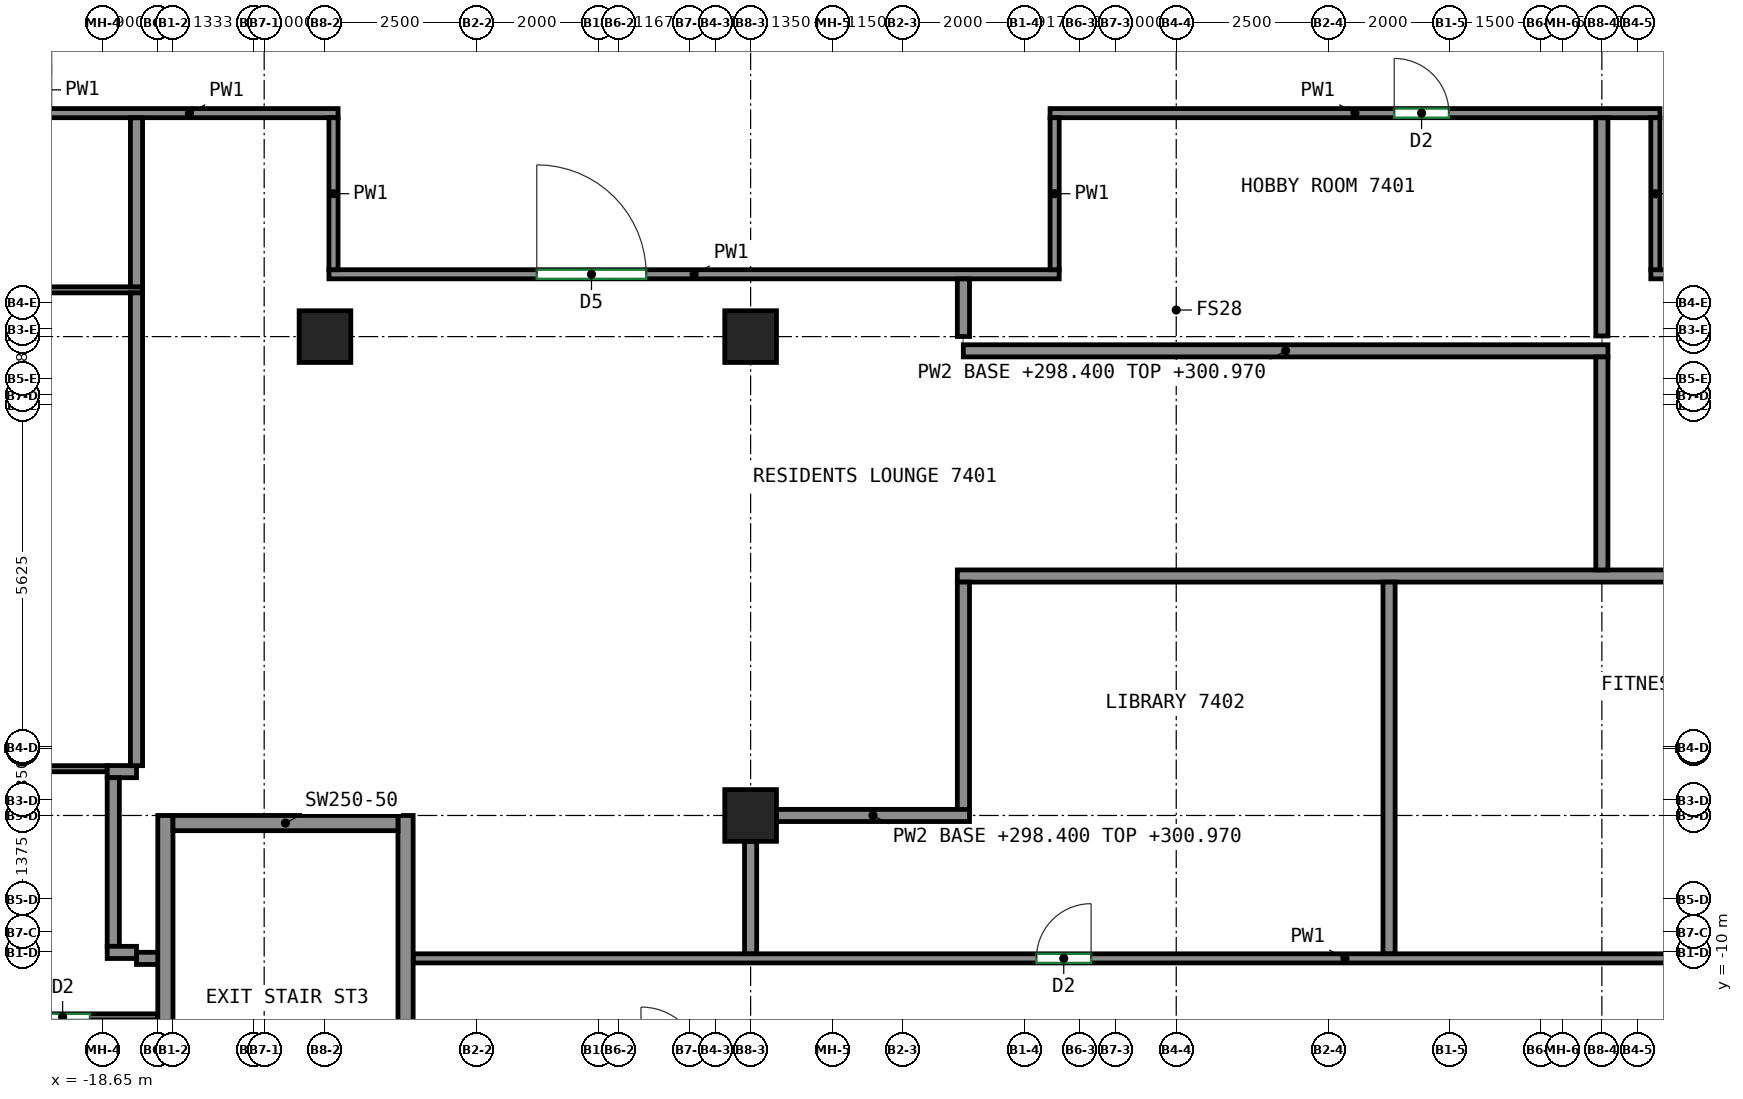
"""IFC4 building model, lengths in metres.
Left out: names, types, materials, properties, quantities, classifications, styles, units other than length and angle.
Written with IfcOpenShell. Run it as: python <this file> out.ifc"""

import sys

from ifc_helpers import new_model, si_unit, direction, frame, frame_2d, origin, origin_2d, place, context, subcontext, project, spatial, rectangle, extrude, source, transform, mapped, element, fill, save


model = new_model("IFC4")
c1 = context("Model", 3, precision=1e-05, world=origin(), true_north=direction((0.0, 1.0)))
c2 = subcontext(c1, "Body", "Model", "MODEL_VIEW")
j1 = project(units=[si_unit("LENGTHUNIT", "METRE"), si_unit("PLANEANGLEUNIT", "RADIAN")], contexts=[c1])
p1 = place(None, origin())
s1 = spatial("IfcSite", under=j1, at=p1, CompositionType="ELEMENT")
p2 = place(p1, origin())
s2 = spatial("IfcBuilding", under=s1, at=p2, CompositionType="ELEMENT")
p3 = place(p2, frame((0.0, 0.0, 298.4)))
s3 = spatial("IfcBuildingStorey", under=s2, at=p3, CompositionType="ELEMENT", Elevation=298.4)
m1 = source(origin(), c2, "Body", "SweptSolid", [
    extrude(rectangle(XDim=0.85, YDim=0.85, at=origin_2d()), origin(), (0.0, 0.0, 1.0), 3.12),
])
for number, where, z_axis, x_axis in (
    (1, (-15.0, 0.125, 0.0), (0.0, 0.0, 1.0), (1.0, 0.0, 0.0)),
    (2, (-8.0, -7.75, 0.0), (0.0, 0.0, 1.0), (1.0, 0.0, 0.0)),
    (3, (-8.0, 0.125, 0.0), (0.0, 0.0, 1.0), (1.0, 0.0, 0.0)),
):
    element("IfcColumn", number, at=place(p3, frame(where, z_axis=z_axis, x_axis=x_axis)), inside=s3, PredefinedType="COLUMN", context=c2, shape_type="MappedRepresentation", body=[
        mapped(m1, transform((0.0, 0.0, 0.0))),
    ])
m2 = source(origin(), c2, "Body", "SweptSolid", [
    extrude(rectangle(XDim=8.0, YDim=0.25, at=frame_2d((4.0, 0.0))), origin(), (0.0, 0.0, 1.0), 3.12),
])
for number, where, z_axis, x_axis in (
    (4, (-17.625, -15.75, 0.0), (0.0, 0.0, 1.0), (0.0, 1.0, 0.0)),
    (5, (-13.675, -15.75, 0.0), (0.0, 0.0, 1.0), (0.0, 1.0, 0.0)),
):
    element("IfcWall", number, at=place(p3, frame(where, z_axis=z_axis, x_axis=x_axis)), inside=s3, PredefinedType="SHEAR", context=c2, shape_type="MappedRepresentation", body=[
        mapped(m2, transform((0.0, 0.0, 0.0))),
    ])
m3 = source(origin(), c2, "Body", "SweptSolid", [
    extrude(rectangle(XDim=3.7, YDim=0.25, at=frame_2d((1.85, 0.0))), origin(), (0.0, 0.0, 1.0), 3.12),
])
p4 = place(p3, frame((-17.5, -7.875, 0.0), z_axis=(0.0, 0.0, 1.0), x_axis=(1.0, 0.0, 0.0)))
e6 = element("IfcWall", 6, at=p4, inside=s3, PredefinedType="SHEAR", context=c2, shape_type="MappedRepresentation", body=[
    mapped(m3, transform((0.0, 0.0, 0.0))),
])
p5 = place(p3, frame((-19.675, 3.8, 0.0), z_axis=(0.0, 0.0, 1.0), x_axis=(1.0, 0.0, 0.0)))
e7 = element("IfcWall", 7, at=p5, inside=s3, PredefinedType="PARTITIONING", context=c2, shape_type="SweptSolid", body=[
    extrude(rectangle(XDim=4.89, YDim=0.15, at=frame_2d((2.445, 0.0))), origin(), (0.0, 0.0, 1.0), 3.12),
])
p6 = place(p3, frame((-14.935, 1.15, 0.0), z_axis=(0.0, 0.0, 1.0), x_axis=(1.0, 0.0, 0.0)))
e8 = element("IfcWall", 8, at=p6, inside=s3, PredefinedType="PARTITIONING", context=c2, shape_type="SweptSolid", body=[
    extrude(rectangle(XDim=12.01, YDim=0.15, at=frame_2d((6.005, 0.0))), origin(), (0.0, 0.0, 1.0), 3.12),
])
p7 = place(p6, frame((3.418, 0.0, 0.0)))
e9 = element("IfcOpeningElement", 9, at=p7, cuts=e8, PredefinedType="OPENING", context=c2, shape_type="SweptSolid", body=[
    extrude(rectangle(XDim=1.8, YDim=2.1, at=frame_2d((0.9, 1.05))), frame((0.0, 0.085, 0.0), z_axis=(0.0, -1.0, 0.0), x_axis=(1.0, 0.0, 0.0)), (0.0, 0.0, 1.0), 0.17),
])
p8 = place(p3, frame((-14.86, 3.725, 0.0), z_axis=(0.0, 0.0, 1.0), x_axis=(0.0, -1.0, 0.0)))
e10 = element("IfcWall", 10, at=p8, inside=s3, PredefinedType="PARTITIONING", context=c2, shape_type="SweptSolid", body=[
    extrude(rectangle(XDim=2.5, YDim=0.15, at=frame_2d((1.25, 0.0))), origin(), (0.0, 0.0, 1.0), 3.12),
])
p9 = place(p3, frame((-13.55, -10.1, 0.0), z_axis=(0.0, 0.0, 1.0), x_axis=(1.0, 0.0, 0.0)))
e11 = element("IfcWall", 11, at=p9, inside=s3, PredefinedType="PARTITIONING", context=c2, shape_type="SweptSolid", body=[
    extrude(rectangle(XDim=30.65, YDim=0.15, at=frame_2d((15.325, 0.0))), origin(), (0.0, 0.0, 1.0), 3.12),
])
p10 = place(p9, frame((10.25, 0.0, 0.0)))
e12 = element("IfcOpeningElement", 12, at=p10, cuts=e11, PredefinedType="OPENING", context=c2, shape_type="SweptSolid", body=[
    extrude(rectangle(XDim=0.9, YDim=2.1, at=frame_2d((0.45, 1.05))), frame((0.0, 0.085, 0.0), z_axis=(0.0, -1.0, 0.0), x_axis=(1.0, 0.0, 0.0)), (0.0, 0.0, 1.0), 0.17),
])
p11 = place(p9, frame((22.153, 0.0, 0.0)))
e13 = element("IfcOpeningElement", 13, at=p11, cuts=e11, PredefinedType="OPENING", context=c2, shape_type="SweptSolid", body=[
    extrude(rectangle(XDim=0.9, YDim=2.1, at=frame_2d((0.45, 1.05))), frame((0.0, 0.085, 0.0), z_axis=(0.0, -1.0, 0.0), x_axis=(1.0, 0.0, 0.0)), (0.0, 0.0, 1.0), 0.17),
])
p12 = place(p3, frame((-3.075, 3.8, 0.0), z_axis=(0.0, 0.0, 1.0), x_axis=(1.0, 0.0, 0.0)))
e14 = element("IfcWall", 14, at=p12, inside=s3, PredefinedType="PARTITIONING", context=c2, shape_type="SweptSolid", body=[
    extrude(rectangle(XDim=10.03, YDim=0.15, at=frame_2d((5.015, 0.0))), origin(), (0.0, 0.0, 1.0), 3.12),
])
p13 = place(p12, frame((5.66, 0.0, 0.0)))
e15 = element("IfcOpeningElement", 15, at=p13, cuts=e14, PredefinedType="OPENING", context=c2, shape_type="SweptSolid", body=[
    extrude(rectangle(XDim=0.9, YDim=2.1, at=frame_2d((0.45, 1.05))), frame((0.0, 0.085, 0.0), z_axis=(0.0, -1.0, 0.0), x_axis=(1.0, 0.0, 0.0)), (0.0, 0.0, 1.0), 0.17),
])
p14 = place(p3, frame((-3.0, 1.225, 0.0), z_axis=(0.0, 0.0, 1.0), x_axis=(0.0, 1.0, 0.0)))
e16 = element("IfcWall", 16, at=p14, inside=s3, PredefinedType="PARTITIONING", context=c2, shape_type="SweptSolid", body=[
    extrude(rectangle(XDim=2.5, YDim=0.15, at=frame_2d((1.25, 0.0))), origin(), (0.0, 0.0, 1.0), 3.12),
])
p15 = place(p3, frame((6.805, 1.15, 0.0), z_axis=(0.0, 0.0, 1.0), x_axis=(1.0, 0.0, 0.0)))
e17 = element("IfcWall", 17, at=p15, inside=s3, PredefinedType="PARTITIONING", context=c2, shape_type="SweptSolid", body=[
    extrude(rectangle(XDim=9.595, YDim=0.15, at=frame_2d((4.797, 0.0))), origin(), (0.0, 0.0, 1.0), 3.12),
])
p16 = place(p15, frame((4.828, 0.0, 0.0)))
e18 = element("IfcOpeningElement", 18, at=p16, cuts=e17, PredefinedType="OPENING", context=c2, shape_type="SweptSolid", body=[
    extrude(rectangle(XDim=0.9, YDim=2.1, at=frame_2d((0.45, 1.05))), frame((0.0, 0.085, 0.0), z_axis=(0.0, -1.0, 0.0), x_axis=(1.0, 0.0, 0.0)), (0.0, 0.0, 1.0), 0.17),
])
p17 = place(p3, frame((6.88, 3.725, 0.0), z_axis=(0.0, 0.0, 1.0), x_axis=(0.0, -1.0, 0.0)))
e19 = element("IfcWall", 19, at=p17, inside=s3, PredefinedType="PARTITIONING", context=c2, shape_type="SweptSolid", body=[
    extrude(rectangle(XDim=2.5, YDim=0.15, at=frame_2d((1.25, 0.0))), origin(), (0.0, 0.0, 1.0), 3.12),
])
p18 = place(p3, frame((-17.75, -11.062, 0.0), z_axis=(0.0, 0.0, 1.0), x_axis=(-1.0, 0.0, 0.0)))
e20 = element("IfcWall", 20, at=p18, inside=s3, PredefinedType="PARTITIONING", context=c2, shape_type="SweptSolid", body=[
    extrude(rectangle(XDim=7.5, YDim=0.1, at=frame_2d((3.75, 0.0))), origin(), (0.0, 0.0, 1.0), 3.12),
])
p19 = place(p18, frame((1.115, 0.0, 0.0)))
e21 = element("IfcOpeningElement", 21, at=p19, cuts=e20, PredefinedType="OPENING", context=c2, shape_type="SweptSolid", body=[
    extrude(rectangle(XDim=0.9, YDim=2.1, at=frame_2d((0.45, 1.05))), frame((0.0, 0.06, 0.0), z_axis=(0.0, -1.0, 0.0), x_axis=(1.0, 0.0, 0.0)), (0.0, 0.0, 1.0), 0.12),
])
p20 = place(p3, frame((-18.582, -6.981, 0.0), z_axis=(0.0, 0.0, 1.0), x_axis=(-1.0, 0.0, 0.0)))
e22 = element("IfcWall", 22, at=p20, inside=s3, PredefinedType="PARTITIONING", context=c2, shape_type="SweptSolid", body=[
    extrude(rectangle(XDim=6.668, YDim=0.1, at=frame_2d((3.334, 0.0))), origin(), (0.0, 0.0, 1.0), 3.12),
])
p21 = place(p20, frame((3.249, 0.0, 0.0)))
e23 = element("IfcOpeningElement", 23, at=p21, cuts=e22, PredefinedType="OPENING", context=c2, shape_type="SweptSolid", body=[
    extrude(rectangle(XDim=0.9, YDim=2.1, at=frame_2d((0.45, 1.05))), frame((0.0, 0.06, 0.0), z_axis=(0.0, -1.0, 0.0), x_axis=(1.0, 0.0, 0.0)), (0.0, 0.0, 1.0), 0.12),
])
p22 = place(p3, frame((-17.7, -10.1, 0.0), z_axis=(0.0, 0.0, 1.0), x_axis=(-1.0, 0.0, 0.0)))
e24 = element("IfcWall", 24, at=p22, inside=s3, PredefinedType="PARTITIONING", context=c2, shape_type="SweptSolid", body=[
    extrude(rectangle(XDim=0.4, YDim=0.2, at=frame_2d((0.2, 0.0))), origin(), (0.0, 0.0, 1.0), 3.12),
])
p23 = place(p3, frame((-18.582, -7.029, 0.0), z_axis=(0.0, 0.0, 1.0), x_axis=(1.0, 0.0, 0.0)))
e25 = element("IfcWall", 25, at=p23, inside=s3, PredefinedType="PARTITIONING", context=c2, shape_type="SweptSolid", body=[
    extrude(rectangle(XDim=0.482, YDim=0.2, at=frame_2d((0.241, 0.0))), origin(), (0.0, 0.0, 1.0), 3.12),
])
p24 = place(p3, frame((-18.482, -9.902, 0.0), z_axis=(0.0, 0.0, 1.0), x_axis=(0.0, 1.0, 0.0)))
e26 = element("IfcWall", 26, at=p24, inside=s3, PredefinedType="PARTITIONING", context=c2, shape_type="SweptSolid", body=[
    extrude(rectangle(XDim=2.773, YDim=0.2, at=frame_2d((1.387, 0.0))), origin(), (0.0, 0.0, 1.0), 3.12),
])
p25 = place(p3, frame((-18.1, -10.002, 0.0), z_axis=(0.0, 0.0, 1.0), x_axis=(-1.0, 0.0, 0.0)))
e27 = element("IfcWall", 27, at=p25, inside=s3, PredefinedType="PARTITIONING", context=c2, shape_type="SweptSolid", body=[
    extrude(rectangle(XDim=0.482, YDim=0.2, at=frame_2d((0.241, 0.0))), origin(), (0.0, 0.0, 1.0), 3.12),
])
p26 = place(p3, frame((-18.0, 0.894, 0.0), z_axis=(0.0, 0.0, 1.0), x_axis=(-1.0, 0.0, 0.0)))
e28 = element("IfcWall", 28, at=p26, inside=s3, PredefinedType="PARTITIONING", context=c2, shape_type="SweptSolid", body=[
    extrude(rectangle(XDim=7.25, YDim=0.1, at=frame_2d((3.625, 0.0))), origin(), (0.0, 0.0, 1.0), 3.12),
])
p27 = place(p26, frame((4.335, 0.0, 0.0)))
e29 = element("IfcOpeningElement", 29, at=p27, cuts=e28, PredefinedType="OPENING", context=c2, shape_type="SweptSolid", body=[
    extrude(rectangle(XDim=0.9, YDim=2.1, at=frame_2d((0.45, 1.05))), frame((0.0, 0.06, 0.0), z_axis=(0.0, -1.0, 0.0), x_axis=(1.0, 0.0, 0.0)), (0.0, 0.0, 1.0), 0.12),
])
p28 = place(p3, frame((-18.1, -6.931, 0.0), z_axis=(0.0, 0.0, 1.0), x_axis=(0.0, 1.0, 0.0)))
e30 = element("IfcWall", 30, at=p28, inside=s3, PredefinedType="PARTITIONING", context=c2, shape_type="SweptSolid", body=[
    extrude(rectangle(XDim=7.775, YDim=0.2, at=frame_2d((3.887, 0.0))), origin(), (0.0, 0.0, 1.0), 3.12),
])
p29 = place(p3, frame((-18.1, 0.944, 0.0), z_axis=(0.0, 0.0, 1.0), x_axis=(0.0, 1.0, 0.0)))
e31 = element("IfcWall", 31, at=p29, inside=s3, PredefinedType="PARTITIONING", context=c2, shape_type="SweptSolid", body=[
    extrude(rectangle(XDim=2.779, YDim=0.2, at=frame_2d((1.389, 0.0))), origin(), (0.0, 0.0, 1.0), 3.12),
])
p30 = place(p3, frame((-4.6, -3.812, 0.0), z_axis=(0.0, 0.0, 1.0), x_axis=(1.0, 0.0, 0.0)))
e32 = element("IfcWall", 32, at=p30, inside=s3, PredefinedType="PARTITIONING", context=c2, shape_type="SweptSolid", body=[
    extrude(rectangle(XDim=17.7, YDim=0.2, at=frame_2d((8.85, 0.0))), origin(), (0.0, 0.0, 1.0), 3.12),
])
p31 = place(p3, frame((-4.5, -7.65, 0.0), z_axis=(0.0, 0.0, 1.0), x_axis=(0.0, 1.0, 0.0)))
e33 = element("IfcWall", 33, at=p31, inside=s3, PredefinedType="PARTITIONING", context=c2, shape_type="SweptSolid", body=[
    extrude(rectangle(XDim=3.738, YDim=0.2, at=frame_2d((1.869, 0.0))), origin(), (0.0, 0.0, 1.0), 3.12),
])
p32 = place(p3, frame((-7.575, -7.75, 0.0), z_axis=(0.0, 0.0, 1.0), x_axis=(1.0, 0.0, 0.0)))
e34 = element("IfcWall", 34, at=p32, inside=s3, PredefinedType="PARTITIONING", context=c2, shape_type="SweptSolid", body=[
    extrude(rectangle(XDim=3.175, YDim=0.2, at=frame_2d((1.587, 0.0))), origin(), (0.0, 0.0, 1.0), 2.57),
])
p33 = place(p3, frame((-8.0, -10.023, 0.0), z_axis=(0.0, 0.0, 1.0), x_axis=(0.0, 1.0, 0.0)))
e35 = element("IfcWall", 35, at=p33, inside=s3, PredefinedType="PARTITIONING", context=c2, shape_type="SweptSolid", body=[
    extrude(rectangle(XDim=1.848, YDim=0.2, at=frame_2d((0.924, 0.0))), origin(), (0.0, 0.0, 1.0), 3.12),
])
p34 = place(p3, frame((-4.5, 0.127, 0.0), z_axis=(0.0, 0.0, 1.0), x_axis=(0.0, 1.0, 0.0)))
e36 = element("IfcWall", 36, at=p34, inside=s3, PredefinedType="PARTITIONING", context=c2, shape_type="SweptSolid", body=[
    extrude(rectangle(XDim=0.946, YDim=0.2, at=frame_2d((0.473, 0.0))), origin(), (0.0, 0.0, 1.0), 3.12),
])
p35 = place(p3, frame((6.1, -0.109, 0.0), z_axis=(0.0, 0.0, 1.0), x_axis=(-1.0, 0.0, 0.0)))
e37 = element("IfcWall", 37, at=p35, inside=s3, PredefinedType="PARTITIONING", context=c2, shape_type="SweptSolid", body=[
    extrude(rectangle(XDim=10.602, YDim=0.2, at=frame_2d((5.301, 0.0))), origin(), (0.0, 0.0, 1.0), 2.57),
])
p36 = place(p3, frame((6.0, -3.712, 0.0), z_axis=(0.0, 0.0, 1.0), x_axis=(0.0, 1.0, 0.0)))
e38 = element("IfcWall", 38, at=p36, inside=s3, PredefinedType="PARTITIONING", context=c2, shape_type="SweptSolid", body=[
    extrude(rectangle(XDim=3.503, YDim=0.2, at=frame_2d((1.751, 0.0))), origin(), (0.0, 0.0, 1.0), 3.12),
])
p37 = place(p3, frame((2.5, -10.023, 0.0), z_axis=(0.0, 0.0, 1.0), x_axis=(0.0, 1.0, 0.0)))
e39 = element("IfcWall", 39, at=p37, inside=s3, PredefinedType="PARTITIONING", context=c2, shape_type="SweptSolid", body=[
    extrude(rectangle(XDim=6.111, YDim=0.2, at=frame_2d((3.055, 0.0))), origin(), (0.0, 0.0, 1.0), 3.12),
])
p38 = place(p3, frame((6.0, 0.136, 0.0), z_axis=(0.0, 0.0, 1.0), x_axis=(0.0, 1.0, 0.0)))
e40 = element("IfcWall", 40, at=p38, inside=s3, PredefinedType="PARTITIONING", context=c2, shape_type="SweptSolid", body=[
    extrude(rectangle(XDim=3.587, YDim=0.2, at=frame_2d((1.793, 0.0))), origin(), (0.0, 0.0, 1.0), 3.12),
])
p39 = place(p19, origin())
e41 = element("IfcDoor", 41, at=p39, inside=s3, OperationType="SINGLE_SWING_LEFT", PredefinedType="DOOR", context=c2, shape_type="SweptSolid", body=[
    extrude(rectangle(XDim=0.9, YDim=2.1, at=frame_2d((0.45, 1.05))), frame((0.0, 0.025, 0.0), z_axis=(0.0, -1.0, 0.0), x_axis=(1.0, 0.0, 0.0)), (0.0, 0.0, 1.0), 0.05),
])
fill(e21, e41)
p40 = place(p10, origin())
e42 = element("IfcDoor", 42, at=p40, inside=s3, OperationType="SINGLE_SWING_RIGHT", PredefinedType="DOOR", context=c2, shape_type="SweptSolid", body=[
    extrude(rectangle(XDim=0.9, YDim=2.1, at=frame_2d((0.45, 1.05))), frame((0.0, 0.025, 0.0), z_axis=(0.0, -1.0, 0.0), x_axis=(1.0, 0.0, 0.0)), (0.0, 0.0, 1.0), 0.05),
])
fill(e12, e42)
p41 = place(p7, origin())
e43 = element("IfcDoor", 43, at=p41, inside=s3, OperationType="DOUBLE_DOOR_SINGLE_SWING", PredefinedType="DOOR", context=c2, shape_type="SweptSolid", body=[
    extrude(rectangle(XDim=1.8, YDim=2.1, at=frame_2d((0.9, 1.05))), frame((0.0, 0.025, 0.0), z_axis=(0.0, -1.0, 0.0), x_axis=(1.0, 0.0, 0.0)), (0.0, 0.0, 1.0), 0.05),
])
fill(e9, e43)
p42 = place(p13, origin())
e44 = element("IfcDoor", 44, at=p42, inside=s3, OperationType="SINGLE_SWING_LEFT", PredefinedType="DOOR", context=c2, shape_type="SweptSolid", body=[
    extrude(rectangle(XDim=0.9, YDim=2.1, at=frame_2d((0.45, 1.05))), frame((0.0, 0.025, 0.0), z_axis=(0.0, -1.0, 0.0), x_axis=(1.0, 0.0, 0.0)), (0.0, 0.0, 1.0), 0.05),
])
fill(e15, e44)
save(model, sys.argv[1])
